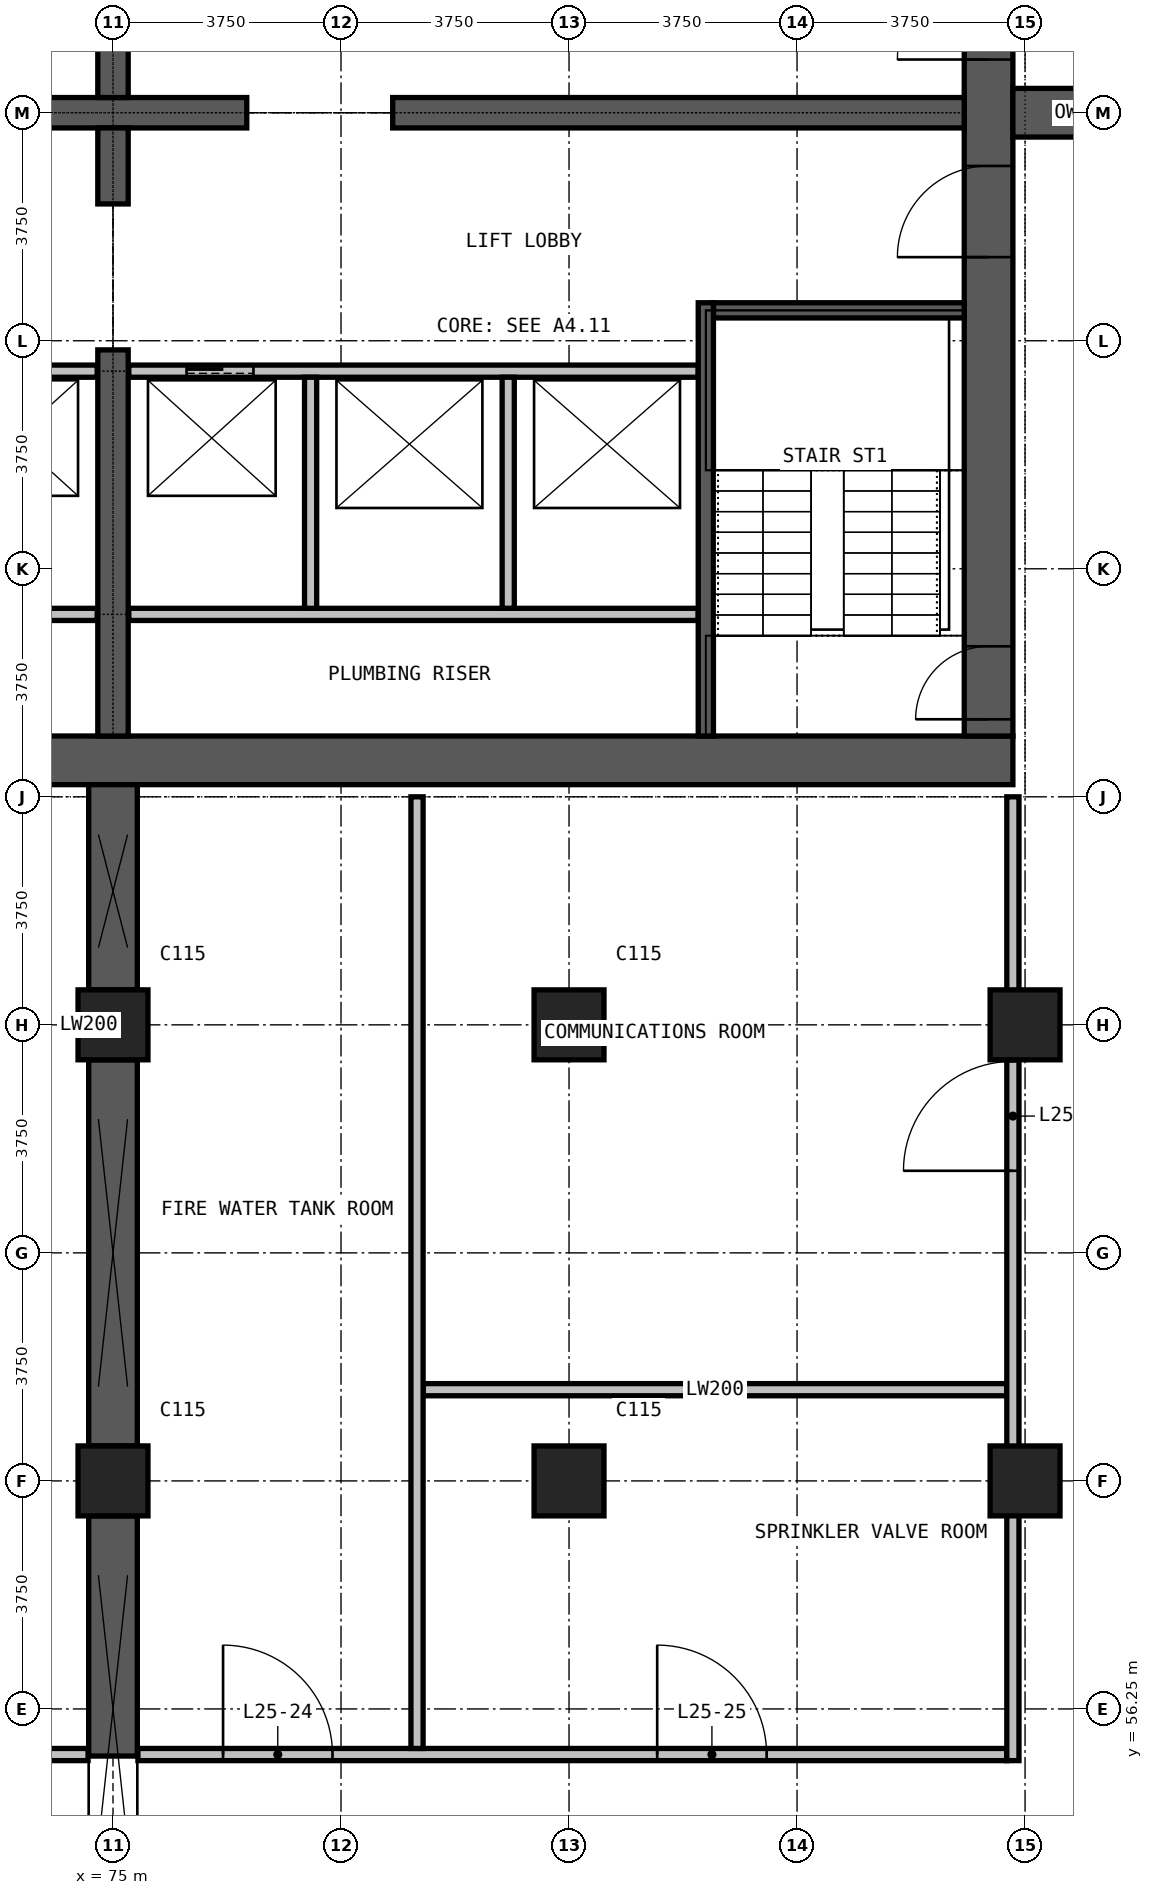
"""IFC4 building model, lengths in metres.
Left out: names, types, materials, properties, quantities, classifications, styles, units other than length and angle.
Written with IfcOpenShell. Run it as: python <this file> out.ifc"""

import sys

from ifc_helpers import new_model, si_unit, direction, frame, frame_2d, origin, origin_2d, place, context, subcontext, project, spatial, rectangle, extrude, element, fill, save


model = new_model("IFC4")
c1 = context("Model", 3, precision=1e-05, world=origin(), true_north=direction((0.0, 1.0)))
c2 = subcontext(c1, "Body", "Model", "MODEL_VIEW")
j1 = project(units=[si_unit("LENGTHUNIT", "METRE"), si_unit("PLANEANGLEUNIT", "RADIAN")], contexts=[c1])
p1 = place(None, origin())
s1 = spatial("IfcSite", under=j1, at=p1, CompositionType="ELEMENT")
p2 = place(p1, origin())
s2 = spatial("IfcBuilding", under=s1, at=p2, CompositionType="ELEMENT")
p3 = place(p2, frame((0.0, 0.0, 102.2)))
s3 = spatial("IfcBuildingStorey", under=s2, at=p3, CompositionType="ELEMENT", Elevation=102.2)
for number, where, z_axis, x_axis in (
    (1, (75.0, 60.0, 0.0), (0.0, 0.0, 1.0), (1.0, 0.0, 0.0)),
    (2, (75.0, 67.5, 0.0), (0.0, 0.0, 1.0), (1.0, 0.0, 0.0)),
    (3, (82.5, 60.0, 0.0), (0.0, 0.0, 1.0), (1.0, 0.0, 0.0)),
    (4, (82.5, 67.5, 0.0), (0.0, 0.0, 1.0), (1.0, 0.0, 0.0)),
    (5, (90.0, 60.0, 0.0), (0.0, 0.0, 1.0), (1.0, 0.0, 0.0)),
    (6, (90.0, 67.5, 0.0), (0.0, 0.0, 1.0), (1.0, 0.0, 0.0)),
):
    element("IfcColumn", number, at=place(p3, frame(where, z_axis=z_axis, x_axis=x_axis)), inside=s3, PredefinedType="COLUMN", context=c2, shape_type="SweptSolid", body=[
        extrude(rectangle(XDim=1.15, YDim=1.15, at=origin_2d()), origin(), (0.0, 0.0, 1.0), 5.0),
    ])
p4 = place(p3, frame((60.2, 71.85, 0.0), z_axis=(0.0, 0.0, 1.0), x_axis=(1.0, 0.0, 0.0)))
e7 = element("IfcWall", 7, at=p4, inside=s3, PredefinedType="SHEAR", context=c2, shape_type="SweptSolid", body=[
    extrude(rectangle(XDim=29.6, YDim=0.8, at=frame_2d((14.8, 0.0))), origin(), (0.0, 0.0, 1.0), 5.0),
])
p5 = place(p3, frame((89.4, 72.25, 0.0), z_axis=(0.0, 0.0, 1.0), x_axis=(0.0, 1.0, 0.0)))
e8 = element("IfcWall", 8, at=p5, inside=s3, PredefinedType="SHEAR", context=c2, shape_type="SweptSolid", body=[
    extrude(rectangle(XDim=20.5, YDim=0.8, at=frame_2d((10.25, 0.0))), origin(), (0.0, 0.0, 1.0), 5.0),
])
p6 = place(p5, frame((0.275, 0.0, 0.0)))
e9 = element("IfcOpeningElement", 9, at=p6, cuts=e8, PredefinedType="OPENING", context=c2, shape_type="SweptSolid", body=[
    extrude(rectangle(XDim=1.2, YDim=2.2, at=frame_2d((0.6, 1.1))), frame((0.0, 0.41, 0.0), z_axis=(0.0, -1.0, 0.0), x_axis=(1.0, 0.0, 0.0)), (0.0, 0.0, 1.0), 0.82),
])
p7 = place(p5, frame((13.775, 0.0, 0.0)))
e10 = element("IfcOpeningElement", 10, at=p7, cuts=e8, PredefinedType="OPENING", context=c2, shape_type="SweptSolid", body=[
    extrude(rectangle(XDim=1.2, YDim=2.2, at=frame_2d((0.6, 1.1))), frame((0.0, 0.41, 0.0), z_axis=(0.0, -1.0, 0.0), x_axis=(1.0, 0.0, 0.0)), (0.0, 0.0, 1.0), 0.82),
])
p8 = place(p5, frame((7.875, 0.0, 0.0)))
e11 = element("IfcOpeningElement", 11, at=p8, cuts=e8, PredefinedType="OPENING", context=c2, shape_type="SweptSolid", body=[
    extrude(rectangle(XDim=1.5, YDim=2.2, at=frame_2d((0.75, 1.1))), frame((0.0, 0.41, 0.0), z_axis=(0.0, -1.0, 0.0), x_axis=(1.0, 0.0, 0.0)), (0.0, 0.0, 1.0), 0.82),
])
p9 = place(p5, frame((11.125, 0.0, 0.0)))
e12 = element("IfcOpeningElement", 12, at=p9, cuts=e8, PredefinedType="OPENING", context=c2, shape_type="SweptSolid", body=[
    extrude(rectangle(XDim=1.5, YDim=2.2, at=frame_2d((0.75, 1.1))), frame((0.0, 0.41, 0.0), z_axis=(0.0, -1.0, 0.0), x_axis=(1.0, 0.0, 0.0)), (0.0, 0.0, 1.0), 0.82),
])
p10 = place(p3, frame((72.8, 82.5, 0.0), z_axis=(0.0, 0.0, 1.0), x_axis=(1.0, 0.0, 0.0)))
e13 = element("IfcWall", 13, at=p10, inside=s3, PredefinedType="SHEAR", context=c2, shape_type="SweptSolid", body=[
    extrude(rectangle(XDim=4.4, YDim=0.5, at=frame_2d((2.2, 0.0))), origin(), (0.0, 0.0, 1.0), 5.0),
])
p11 = place(p3, frame((79.6, 82.5, 0.0), z_axis=(0.0, 0.0, 1.0), x_axis=(1.0, 0.0, 0.0)))
e14 = element("IfcWall", 14, at=p11, inside=s3, PredefinedType="SHEAR", context=c2, shape_type="SweptSolid", body=[
    extrude(rectangle(XDim=9.4, YDim=0.5, at=frame_2d((4.7, 0.0))), origin(), (0.0, 0.0, 1.0), 5.0),
])
p12 = place(p3, frame((75.0, 72.25, 0.0), z_axis=(0.0, 0.0, 1.0), x_axis=(0.0, 1.0, 0.0)))
e15 = element("IfcWall", 15, at=p12, inside=s3, PredefinedType="SHEAR", context=c2, shape_type="SweptSolid", body=[
    extrude(rectangle(XDim=6.35, YDim=0.5, at=frame_2d((3.175, 0.0))), origin(), (0.0, 0.0, 1.0), 5.0),
])
for number, where, z_axis, x_axis in (
    (16, (75.0, 81.0, 0.0), (0.0, 0.0, 1.0), (0.0, 1.0, 0.0)),
    (17, (75.0, 82.75, 0.0), (0.0, 0.0, 1.0), (0.0, 1.0, 0.0)),
):
    element("IfcWall", number, at=place(p3, frame(where, z_axis=z_axis, x_axis=x_axis)), inside=s3, PredefinedType="SHEAR", context=c2, shape_type="SweptSolid", body=[
        extrude(rectangle(XDim=1.25, YDim=0.5, at=frame_2d((0.625, 0.0))), origin(), (0.0, 0.0, 1.0), 5.0),
    ])
p13 = place(p3, frame((89.8, 82.5, 0.0), z_axis=(0.0, 0.0, 1.0), x_axis=(1.0, 0.0, 0.0)))
e18 = element("IfcWall", 18, at=p13, inside=s3, PredefinedType="SHEAR", context=c2, shape_type="SweptSolid", body=[
    extrude(rectangle(XDim=2.325, YDim=0.8, at=frame_2d((1.163, 0.0))), origin(), (0.0, 0.0, 1.0), 4.7),
])
p14 = place(p3, frame((75.0, 55.475, 0.0), z_axis=(0.0, 0.0, 1.0), x_axis=(0.0, 1.0, 0.0)))
e19 = element("IfcWall", 19, at=p14, inside=s3, PredefinedType="SHEAR", context=c2, shape_type="SweptSolid", body=[
    extrude(rectangle(XDim=3.95, YDim=0.8, at=frame_2d((1.975, 0.0))), origin(), (0.0, 0.0, 1.0), 4.7),
])
p15 = place(p3, frame((75.0, 60.575, 0.0), z_axis=(0.0, 0.0, 1.0), x_axis=(0.0, 1.0, 0.0)))
e20 = element("IfcWall", 20, at=p15, inside=s3, PredefinedType="SHEAR", context=c2, shape_type="SweptSolid", body=[
    extrude(rectangle(XDim=6.35, YDim=0.8, at=frame_2d((3.175, 0.0))), origin(), (0.0, 0.0, 1.0), 4.7),
])
p16 = place(p3, frame((75.0, 68.075, 0.0), z_axis=(0.0, 0.0, 1.0), x_axis=(0.0, 1.0, 0.0)))
e21 = element("IfcWall", 21, at=p16, inside=s3, PredefinedType="SHEAR", context=c2, shape_type="SweptSolid", body=[
    extrude(rectangle(XDim=3.375, YDim=0.8, at=frame_2d((1.688, 0.0))), origin(), (0.0, 0.0, 1.0), 4.7),
])
p17 = place(p3, frame((60.3, 55.5, 0.0), z_axis=(0.0, 0.0, 1.0), x_axis=(1.0, 0.0, 0.0)))
e22 = element("IfcWall", 22, at=p17, inside=s3, PredefinedType="PARTITIONING", context=c2, shape_type="SweptSolid", body=[
    extrude(rectangle(XDim=14.29, YDim=0.2, at=frame_2d((7.145, 0.0))), origin(), (0.0, 0.0, 1.0), 4.7),
])
p18 = place(p17, frame((3.95, 0.0, 0.0)))
e23 = element("IfcOpeningElement", 23, at=p18, cuts=e22, PredefinedType="OPENING", context=c2, shape_type="SweptSolid", body=[
    extrude(rectangle(XDim=1.8, YDim=2.4, at=frame_2d((0.9, 1.2))), frame((0.0, 0.11, 0.0), z_axis=(0.0, -1.0, 0.0), x_axis=(1.0, 0.0, 0.0)), (0.0, 0.0, 1.0), 0.22),
])
p19 = place(p17, frame((11.1, 0.0, 0.0)))
e24 = element("IfcOpeningElement", 24, at=p19, cuts=e22, PredefinedType="OPENING", context=c2, shape_type="SweptSolid", body=[
    extrude(rectangle(XDim=1.8, YDim=2.4, at=frame_2d((0.9, 1.2))), frame((0.0, 0.11, 0.0), z_axis=(0.0, -1.0, 0.0), x_axis=(1.0, 0.0, 0.0)), (0.0, 0.0, 1.0), 0.22),
])
p20 = place(p3, frame((75.41, 55.5, 0.0), z_axis=(0.0, 0.0, 1.0), x_axis=(1.0, 0.0, 0.0)))
e25 = element("IfcWall", 25, at=p20, inside=s3, PredefinedType="PARTITIONING", context=c2, shape_type="SweptSolid", body=[
    extrude(rectangle(XDim=14.29, YDim=0.2, at=frame_2d((7.145, 0.0))), origin(), (0.0, 0.0, 1.0), 4.7),
])
p21 = place(p20, frame((1.4, 0.0, 0.0)))
e26 = element("IfcOpeningElement", 26, at=p21, cuts=e25, PredefinedType="OPENING", context=c2, shape_type="SweptSolid", body=[
    extrude(rectangle(XDim=1.8, YDim=2.4, at=frame_2d((0.9, 1.2))), frame((0.0, 0.11, 0.0), z_axis=(0.0, -1.0, 0.0), x_axis=(1.0, 0.0, 0.0)), (0.0, 0.0, 1.0), 0.22),
])
p22 = place(p20, frame((8.54, 0.0, 0.0)))
e27 = element("IfcOpeningElement", 27, at=p22, cuts=e25, PredefinedType="OPENING", context=c2, shape_type="SweptSolid", body=[
    extrude(rectangle(XDim=1.8, YDim=2.4, at=frame_2d((0.9, 1.2))), frame((0.0, 0.11, 0.0), z_axis=(0.0, -1.0, 0.0), x_axis=(1.0, 0.0, 0.0)), (0.0, 0.0, 1.0), 0.22),
])
p23 = place(p3, frame((80.1, 61.5, 0.0), z_axis=(0.0, 0.0, 1.0), x_axis=(1.0, 0.0, 0.0)))
e28 = element("IfcWall", 28, at=p23, inside=s3, PredefinedType="PARTITIONING", context=c2, shape_type="SweptSolid", body=[
    extrude(rectangle(XDim=9.6, YDim=0.2, at=frame_2d((4.8, 0.0))), origin(), (0.0, 0.0, 1.0), 4.7),
])
for number, where, z_axis, x_axis in (
    (29, (74.6, 59.435, 0.0), (0.0, 0.0, 1.0), (0.0, 1.0, 0.0)),
    (30, (74.6, 66.935, 0.0), (0.0, 0.0, 1.0), (0.0, 1.0, 0.0)),
    (31, (75.4, 59.435, 0.0), (0.0, 0.0, 1.0), (0.0, 1.0, 0.0)),
    (32, (75.4, 66.935, 0.0), (0.0, 0.0, 1.0), (0.0, 1.0, 0.0)),
):
    element("IfcWall", number, at=place(p3, frame(where, z_axis=z_axis, x_axis=x_axis)), inside=s3, PredefinedType="PARTITIONING", context=c2, shape_type="SweptSolid", body=[
        extrude(rectangle(XDim=1.13, YDim=0.2, at=frame_2d((0.565, 0.0))), origin(), (0.0, 0.0, 1.0), 4.7),
    ])
p24 = place(p3, frame((80.0, 55.6, 0.0), z_axis=(0.0, 0.0, 1.0), x_axis=(0.0, 1.0, 0.0)))
e33 = element("IfcWall", 33, at=p24, inside=s3, PredefinedType="PARTITIONING", context=c2, shape_type="SweptSolid", body=[
    extrude(rectangle(XDim=15.65, YDim=0.2, at=frame_2d((7.825, 0.0))), origin(), (0.0, 0.0, 1.0), 4.7),
])
p25 = place(p3, frame((89.8, 55.4, 0.0), z_axis=(0.0, 0.0, 1.0), x_axis=(0.0, 1.0, 0.0)))
e34 = element("IfcWall", 34, at=p25, inside=s3, PredefinedType="PARTITIONING", context=c2, shape_type="SweptSolid", body=[
    extrude(rectangle(XDim=15.85, YDim=0.2, at=frame_2d((7.925, 0.0))), origin(), (0.0, 0.0, 1.0), 4.7),
])
p26 = place(p25, frame((9.7, 0.0, 0.0)))
e35 = element("IfcOpeningElement", 35, at=p26, cuts=e34, PredefinedType="OPENING", context=c2, shape_type="SweptSolid", body=[
    extrude(rectangle(XDim=1.8, YDim=2.4, at=frame_2d((0.9, 1.2))), frame((0.0, 0.11, 0.0), z_axis=(0.0, -1.0, 0.0), x_axis=(1.0, 0.0, 0.0)), (0.0, 0.0, 1.0), 0.22),
])
for number, where, z_axis, x_axis in (
    (36, (65.375, 74.25, 0.0), (0.0, 0.0, 1.0), (1.0, 0.0, 0.0)),
    (37, (75.26, 74.25, 0.0), (0.0, 0.0, 1.0), (1.0, 0.0, 0.0)),
):
    element("IfcWall", number, at=place(p3, frame(where, z_axis=z_axis, x_axis=x_axis)), inside=s3, PredefinedType="PARTITIONING", context=c2, shape_type="SweptSolid", body=[
        extrude(rectangle(XDim=9.365, YDim=0.2, at=frame_2d((4.683, 0.0))), origin(), (0.0, 0.0, 1.0), 4.7),
    ])
p27 = place(p3, frame((65.375, 78.25, 0.0), z_axis=(0.0, 0.0, 1.0), x_axis=(1.0, 0.0, 0.0)))
e38 = element("IfcWall", 38, at=p27, inside=s3, PredefinedType="PARTITIONING", context=c2, shape_type="SweptSolid", body=[
    extrude(rectangle(XDim=9.365, YDim=0.2, at=frame_2d((4.683, 0.0))), origin(), (0.0, 0.0, 1.0), 4.7),
])
p28 = place(p27, frame((1.0, 0.0, 0.0)))
e39 = element("IfcOpeningElement", 39, at=p28, cuts=e38, PredefinedType="OPENING", context=c2, shape_type="SweptSolid", body=[
    extrude(rectangle(XDim=1.1, YDim=2.2, at=frame_2d((0.55, 1.1))), frame((0.0, 0.11, 0.0), z_axis=(0.0, -1.0, 0.0), x_axis=(1.0, 0.0, 0.0)), (0.0, 0.0, 1.0), 0.22),
])
p29 = place(p27, frame((4.175, 0.0, 0.0)))
e40 = element("IfcOpeningElement", 40, at=p29, cuts=e38, PredefinedType="OPENING", context=c2, shape_type="SweptSolid", body=[
    extrude(rectangle(XDim=1.1, YDim=2.2, at=frame_2d((0.55, 1.1))), frame((0.0, 0.11, 0.0), z_axis=(0.0, -1.0, 0.0), x_axis=(1.0, 0.0, 0.0)), (0.0, 0.0, 1.0), 0.22),
])
p30 = place(p27, frame((7.325, 0.0, 0.0)))
e41 = element("IfcOpeningElement", 41, at=p30, cuts=e38, PredefinedType="OPENING", context=c2, shape_type="SweptSolid", body=[
    extrude(rectangle(XDim=1.1, YDim=2.2, at=frame_2d((0.55, 1.1))), frame((0.0, 0.11, 0.0), z_axis=(0.0, -1.0, 0.0), x_axis=(1.0, 0.0, 0.0)), (0.0, 0.0, 1.0), 0.22),
])
p31 = place(p3, frame((75.26, 78.25, 0.0), z_axis=(0.0, 0.0, 1.0), x_axis=(1.0, 0.0, 0.0)))
e42 = element("IfcWall", 42, at=p31, inside=s3, PredefinedType="PARTITIONING", context=c2, shape_type="SweptSolid", body=[
    extrude(rectangle(XDim=9.365, YDim=0.2, at=frame_2d((4.683, 0.0))), origin(), (0.0, 0.0, 1.0), 4.7),
])
p32 = place(p31, frame((0.95, 0.0, 0.0)))
e43 = element("IfcOpeningElement", 43, at=p32, cuts=e42, PredefinedType="OPENING", context=c2, shape_type="SweptSolid", body=[
    extrude(rectangle(XDim=1.1, YDim=2.2, at=frame_2d((0.55, 1.1))), frame((0.0, 0.11, 0.0), z_axis=(0.0, -1.0, 0.0), x_axis=(1.0, 0.0, 0.0)), (0.0, 0.0, 1.0), 0.22),
])
for number, where, z_axis, x_axis in (
    (44, (78.25, 74.35, 0.0), (0.0, 0.0, 1.0), (0.0, 1.0, 0.0)),
    (45, (81.5, 74.35, 0.0), (0.0, 0.0, 1.0), (0.0, 1.0, 0.0)),
):
    element("IfcWall", number, at=place(p3, frame(where, z_axis=z_axis, x_axis=x_axis)), inside=s3, PredefinedType="PARTITIONING", context=c2, shape_type="SweptSolid", body=[
        extrude(rectangle(XDim=3.8, YDim=0.2, at=frame_2d((1.9, 0.0))), origin(), (0.0, 0.0, 1.0), 4.7),
    ])
p33 = place(p3, frame((84.875, 79.25, 0.0), z_axis=(0.0, 0.0, 1.0), x_axis=(1.0, 0.0, 0.0)))
e46 = element("IfcWall", 46, at=p33, inside=s3, PredefinedType="PARTITIONING", context=c2, shape_type="SweptSolid", body=[
    extrude(rectangle(XDim=4.125, YDim=0.25, at=frame_2d((2.062, 0.0))), origin(), (0.0, 0.0, 1.0), 4.7),
])
p34 = place(p3, frame((84.75, 72.25, 0.0), z_axis=(0.0, 0.0, 1.0), x_axis=(0.0, 1.0, 0.0)))
e47 = element("IfcWall", 47, at=p34, inside=s3, PredefinedType="PARTITIONING", context=c2, shape_type="SweptSolid", body=[
    extrude(rectangle(XDim=7.125, YDim=0.25, at=frame_2d((3.562, 0.0))), origin(), (0.0, 0.0, 1.0), 4.7),
])
p35 = place(p32, origin())
e48 = element("IfcDoor", 48, at=p35, inside=s3, OperationType="DOUBLE_DOOR_SLIDING", PredefinedType="DOOR", context=c2, shape_type="SweptSolid", body=[
    extrude(rectangle(XDim=1.1, YDim=2.2, at=frame_2d((0.55, 1.1))), frame((0.0, 0.025, 0.0), z_axis=(0.0, -1.0, 0.0), x_axis=(1.0, 0.0, 0.0)), (0.0, 0.0, 1.0), 0.05),
])
fill(e43, e48)
p36 = place(p6, origin())
e49 = element("IfcDoor", 49, at=p36, inside=s3, OperationType="SINGLE_SWING_RIGHT", PredefinedType="DOOR", context=c2, shape_type="SweptSolid", body=[
    extrude(rectangle(XDim=1.2, YDim=2.2, at=frame_2d((0.6, 1.1))), frame((0.0, 0.025, 0.0), z_axis=(0.0, -1.0, 0.0), x_axis=(1.0, 0.0, 0.0)), (0.0, 0.0, 1.0), 0.05),
])
fill(e9, e49)
p37 = place(p8, origin())
e50 = element("IfcDoor", 50, at=p37, inside=s3, OperationType="DOUBLE_DOOR_SINGLE_SWING", PredefinedType="DOOR", context=c2, shape_type="SweptSolid", body=[
    extrude(rectangle(XDim=1.5, YDim=2.2, at=frame_2d((0.75, 1.1))), frame((0.0, 0.025, 0.0), z_axis=(0.0, -1.0, 0.0), x_axis=(1.0, 0.0, 0.0)), (0.0, 0.0, 1.0), 0.05),
])
fill(e11, e50)
p38 = place(p9, origin())
e51 = element("IfcDoor", 51, at=p38, inside=s3, OperationType="DOUBLE_DOOR_SINGLE_SWING", PredefinedType="DOOR", context=c2, shape_type="SweptSolid", body=[
    extrude(rectangle(XDim=1.5, YDim=2.2, at=frame_2d((0.75, 1.1))), frame((0.0, 0.025, 0.0), z_axis=(0.0, -1.0, 0.0), x_axis=(1.0, 0.0, 0.0)), (0.0, 0.0, 1.0), 0.05),
])
fill(e12, e51)
p39 = place(p21, origin())
e52 = element("IfcDoor", 52, at=p39, inside=s3, OperationType="DOUBLE_DOOR_SINGLE_SWING", PredefinedType="DOOR", context=c2, shape_type="SweptSolid", body=[
    extrude(rectangle(XDim=1.8, YDim=2.4, at=frame_2d((0.9, 1.2))), frame((0.0, 0.025, 0.0), z_axis=(0.0, -1.0, 0.0), x_axis=(1.0, 0.0, 0.0)), (0.0, 0.0, 1.0), 0.05),
])
fill(e26, e52)
p40 = place(p22, origin())
e53 = element("IfcDoor", 53, at=p40, inside=s3, OperationType="DOUBLE_DOOR_SINGLE_SWING", PredefinedType="DOOR", context=c2, shape_type="SweptSolid", body=[
    extrude(rectangle(XDim=1.8, YDim=2.4, at=frame_2d((0.9, 1.2))), frame((0.0, 0.025, 0.0), z_axis=(0.0, -1.0, 0.0), x_axis=(1.0, 0.0, 0.0)), (0.0, 0.0, 1.0), 0.05),
])
fill(e27, e53)
p41 = place(p26, origin())
e54 = element("IfcDoor", 54, at=p41, inside=s3, OperationType="DOUBLE_DOOR_SINGLE_SWING", PredefinedType="DOOR", context=c2, shape_type="SweptSolid", body=[
    extrude(rectangle(XDim=1.8, YDim=2.4, at=frame_2d((0.9, 1.2))), frame((0.0, 0.025, 0.0), z_axis=(0.0, -1.0, 0.0), x_axis=(1.0, 0.0, 0.0)), (0.0, 0.0, 1.0), 0.05),
])
fill(e35, e54)
save(model, sys.argv[1])
